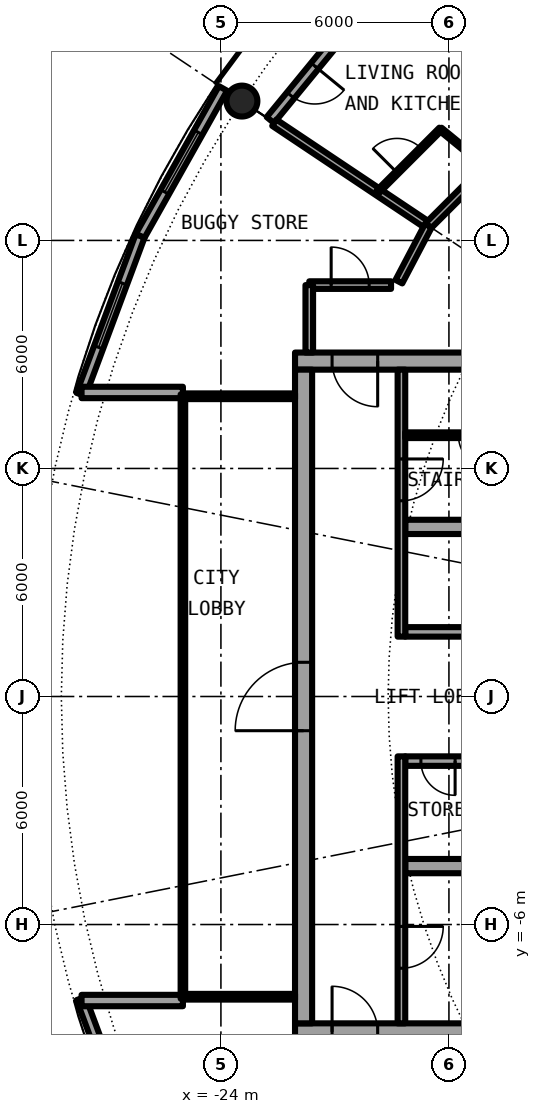
"""IFC4 building model, lengths in metres.
Left out: names, types, materials, properties, quantities, classifications, styles, units other than length and angle.
Written with IfcOpenShell. Run it as: python <this file> out.ifc"""

import sys

from ifc_helpers import new_model, si_unit, direction, frame, frame_2d, origin, origin_2d, place, context, subcontext, project, spatial, rectangle, hollow_circle, extrude, element, fill, save


model = new_model("IFC4")
c1 = context("Model", 3, precision=1e-05, world=origin(), true_north=direction((0.0, 1.0)))
c2 = subcontext(c1, "Body", "Model", "MODEL_VIEW")
j1 = project(units=[si_unit("LENGTHUNIT", "METRE"), si_unit("PLANEANGLEUNIT", "RADIAN")], contexts=[c1])
p1 = place(None, origin())
s1 = spatial("IfcSite", under=j1, at=p1, CompositionType="ELEMENT")
p2 = place(p1, origin())
s2 = spatial("IfcBuilding", under=s1, at=p2, CompositionType="ELEMENT")
p3 = place(p2, frame((0.0, 0.0, 199.35)))
s3 = spatial("IfcBuildingStorey", under=s2, at=p3, CompositionType="ELEMENT", Elevation=199.35)
p4 = place(p3, frame((-23.448, 15.667, 0.0), z_axis=(0.0, 0.0, 1.0), x_axis=(1.0, 0.0, 0.0)))
e1 = element("IfcColumn", 1, at=p4, inside=s3, PredefinedType="COLUMN", context=c2, shape_type="SweptSolid", body=[
    extrude(hollow_circle(Radius=0.406, WallThickness=0.03, at=origin_2d()), origin(), (0.0, 0.0, 1.0), 3.05),
])
p5 = place(p3, frame((-19.304, 19.304, 0.0), z_axis=(0.0, 0.0, 1.0), x_axis=(-0.634382322723, -0.773019449054, 0.0)))
e2 = element("IfcWall", 2, at=p5, inside=s3, PredefinedType="SOLIDWALL", context=c2, shape_type="SweptSolid", body=[
    extrude(rectangle(XDim=5.352, YDim=0.25, at=frame_2d((2.676, 0.0))), origin(), (0.0, 0.0, 1.0), 2.7),
])
p6 = place(p5, frame((0.441, 0.0, 0.3)))
e3 = element("IfcOpeningElement", 3, at=p6, cuts=e2, PredefinedType="OPENING", context=c2, shape_type="SweptSolid", body=[
    extrude(rectangle(XDim=1.8, YDim=2.1, at=frame_2d((0.9, 1.05))), frame((0.0, 0.135, 0.0), z_axis=(0.0, -1.0, 0.0), x_axis=(1.0, 0.0, 0.0)), (0.0, 0.0, 1.0), 0.27),
])
p7 = place(p5, frame((3.51, 0.0, 0.0)))
e4 = element("IfcOpeningElement", 4, at=p7, cuts=e2, PredefinedType="OPENING", context=c2, shape_type="SweptSolid", body=[
    extrude(rectangle(XDim=1.0, YDim=2.2, at=frame_2d((0.5, 1.1))), frame((0.0, 0.135, 0.0), z_axis=(0.0, -1.0, 0.0), x_axis=(1.0, 0.0, 0.0)), (0.0, 0.0, 1.0), 0.27),
])
p8 = place(p3, frame((-27.682, -7.945, 0.0), z_axis=(0.0, 0.0, 1.0), x_axis=(0.349247811493, -0.937030397675, 0.0)))
e5 = element("IfcWall", 5, at=p8, inside=s3, PredefinedType="SOLIDWALL", context=c2, shape_type="SweptSolid", body=[
    extrude(rectangle(XDim=4.452, YDim=0.25, at=frame_2d((2.226, 0.0))), origin(), (0.0, 0.0, 1.0), 2.7),
])
p9 = place(p8, frame((1.327, 0.0, 0.3)))
e6 = element("IfcOpeningElement", 6, at=p9, cuts=e5, PredefinedType="OPENING", context=c2, shape_type="SweptSolid", body=[
    extrude(rectangle(XDim=1.8, YDim=2.1, at=frame_2d((0.9, 1.05))), frame((0.0, 0.135, 0.0), z_axis=(0.0, -1.0, 0.0), x_axis=(1.0, 0.0, 0.0)), (0.0, 0.0, 1.0), 0.27),
])
p10 = place(p3, frame((-23.946, 16.0, 0.0), z_axis=(0.0, 0.0, 1.0), x_axis=(-0.489696356642, -0.871893042919, 0.0)))
e7 = element("IfcWall", 7, at=p10, inside=s3, PredefinedType="SOLIDWALL", context=c2, shape_type="SweptSolid", body=[
    extrude(rectangle(XDim=4.454, YDim=0.25, at=frame_2d((2.227, 0.0))), origin(), (0.0, 0.0, 1.0), 2.7),
])
p11 = place(p10, frame((1.327, 0.0, 0.3)))
e8 = element("IfcOpeningElement", 8, at=p11, cuts=e7, PredefinedType="OPENING", context=c2, shape_type="SweptSolid", body=[
    extrude(rectangle(XDim=1.8, YDim=2.1, at=frame_2d((0.9, 1.05))), frame((0.0, 0.135, 0.0), z_axis=(0.0, -1.0, 0.0), x_axis=(1.0, 0.0, 0.0)), (0.0, 0.0, 1.0), 0.27),
])
p12 = place(p3, frame((-26.127, 12.117, 0.0), z_axis=(0.0, 0.0, 1.0), x_axis=(-0.349247811493, -0.937030397675, 0.0)))
e9 = element("IfcWall", 9, at=p12, inside=s3, PredefinedType="SOLIDWALL", context=c2, shape_type="SweptSolid", body=[
    extrude(rectangle(XDim=4.452, YDim=0.25, at=frame_2d((2.226, 0.0))), origin(), (0.0, 0.0, 1.0), 2.7),
])
p13 = place(p12, frame((1.327, 0.0, 0.3)))
e10 = element("IfcOpeningElement", 10, at=p13, cuts=e9, PredefinedType="OPENING", context=c2, shape_type="SweptSolid", body=[
    extrude(rectangle(XDim=1.8, YDim=2.1, at=frame_2d((0.9, 1.05))), frame((0.0, 0.135, 0.0), z_axis=(0.0, -1.0, 0.0), x_axis=(1.0, 0.0, 0.0)), (0.0, 0.0, 1.0), 0.27),
])
for number, where, z_axis, x_axis in (
    (11, (-25.0, 8.0, 0.0), (0.0, 0.0, 1.0), (-1.0, 0.0, 0.0)),
    (12, (-25.0, -8.0, 0.0), (0.0, 0.0, 1.0), (-1.0, 0.0, 0.0)),
):
    element("IfcWall", number, at=place(p3, frame(where, z_axis=z_axis, x_axis=x_axis)), inside=s3, PredefinedType="SOLIDWALL", context=c2, shape_type="SweptSolid", body=[
        extrude(rectangle(XDim=2.667, YDim=0.3, at=frame_2d((1.333, 0.0))), origin(), (0.0, 0.0, 1.0), 2.7),
    ])
p14 = place(p3, frame((-22.05, -8.825, 0.0), z_axis=(0.0, 0.0, 1.0), x_axis=(1.0, 0.0, 0.0)))
e13 = element("IfcWall", 13, at=p14, inside=s3, PredefinedType="SHEAR", context=c2, shape_type="SweptSolid", body=[
    extrude(rectangle(XDim=13.5, YDim=0.45, at=frame_2d((6.75, 0.0))), origin(), (0.0, 0.0, 1.0), 3.05),
])
p15 = place(p14, frame((0.975, 0.0, 0.0)))
e14 = element("IfcOpeningElement", 14, at=p15, cuts=e13, PredefinedType="OPENING", context=c2, shape_type="SweptSolid", body=[
    extrude(rectangle(XDim=1.2, YDim=2.3, at=frame_2d((0.6, 1.15))), frame((0.0, 0.235, 0.0), z_axis=(0.0, -1.0, 0.0), x_axis=(1.0, 0.0, 0.0)), (0.0, 0.0, 1.0), 0.47),
])
p16 = place(p3, frame((-8.55, 8.825, 0.0), z_axis=(0.0, 0.0, 1.0), x_axis=(-1.0, 0.0, 0.0)))
e15 = element("IfcWall", 15, at=p16, inside=s3, PredefinedType="SHEAR", context=c2, shape_type="SweptSolid", body=[
    extrude(rectangle(XDim=13.5, YDim=0.45, at=frame_2d((6.75, 0.0))), origin(), (0.0, 0.0, 1.0), 3.05),
])
p17 = place(p16, frame((11.325, 0.0, 0.0)))
e16 = element("IfcOpeningElement", 16, at=p17, cuts=e15, PredefinedType="OPENING", context=c2, shape_type="SweptSolid", body=[
    extrude(rectangle(XDim=1.2, YDim=2.3, at=frame_2d((0.6, 1.15))), frame((0.0, 0.235, 0.0), z_axis=(0.0, -1.0, 0.0), x_axis=(1.0, 0.0, 0.0)), (0.0, 0.0, 1.0), 0.47),
])
p18 = place(p3, frame((-21.825, -8.6, 0.0), z_axis=(0.0, 0.0, 1.0), x_axis=(0.0, 1.0, 0.0)))
e17 = element("IfcWall", 17, at=p18, inside=s3, PredefinedType="SHEAR", context=c2, shape_type="SweptSolid", body=[
    extrude(rectangle(XDim=17.2, YDim=0.45, at=frame_2d((8.6, 0.0))), origin(), (0.0, 0.0, 1.0), 3.05),
])
p19 = place(p18, frame((7.7, 0.0, 0.0)))
e18 = element("IfcOpeningElement", 18, at=p19, cuts=e17, PredefinedType="OPENING", context=c2, shape_type="SweptSolid", body=[
    extrude(rectangle(XDim=1.8, YDim=2.3, at=frame_2d((0.9, 1.15))), frame((0.0, 0.235, 0.0), z_axis=(0.0, -1.0, 0.0), x_axis=(1.0, 0.0, 0.0)), (0.0, 0.0, 1.0), 0.47),
])
p20 = place(p3, frame((-9.0, -1.7, 0.0), z_axis=(0.0, 0.0, 1.0), x_axis=(-1.0, 0.0, 0.0)))
e19 = element("IfcWall", 19, at=p20, inside=s3, PredefinedType="SHEAR", context=c2, shape_type="SweptSolid", body=[
    extrude(rectangle(XDim=10.15, YDim=0.25, at=frame_2d((5.075, 0.0))), origin(), (0.0, 0.0, 1.0), 3.05),
])
p21 = place(p20, frame((2.488, 0.0, 0.0)))
e20 = element("IfcOpeningElement", 20, at=p21, cuts=e19, PredefinedType="OPENING", context=c2, shape_type="SweptSolid", body=[
    extrude(rectangle(XDim=0.9, YDim=2.3, at=frame_2d((0.45, 1.15))), frame((0.0, 0.135, 0.0), z_axis=(0.0, -1.0, 0.0), x_axis=(1.0, 0.0, 0.0)), (0.0, 0.0, 1.0), 0.27),
])
p22 = place(p20, frame((8.837, 0.0, 0.0)))
e21 = element("IfcOpeningElement", 21, at=p22, cuts=e19, PredefinedType="OPENING", context=c2, shape_type="SweptSolid", body=[
    extrude(rectangle(XDim=0.9, YDim=2.3, at=frame_2d((0.45, 1.15))), frame((0.0, 0.135, 0.0), z_axis=(0.0, -1.0, 0.0), x_axis=(1.0, 0.0, 0.0)), (0.0, 0.0, 1.0), 0.27),
])
p23 = place(p3, frame((-9.0, -4.462, 0.0), z_axis=(0.0, 0.0, 1.0), x_axis=(-1.0, 0.0, 0.0)))
e22 = element("IfcWall", 22, at=p23, inside=s3, PredefinedType="SHEAR", context=c2, shape_type="SweptSolid", body=[
    extrude(rectangle(XDim=10.15, YDim=0.375, at=frame_2d((5.075, 0.0))), origin(), (0.0, 0.0, 1.0), 3.05),
])
p24 = place(p23, frame((6.6, 0.0, 0.0)))
e23 = element("IfcOpeningElement", 23, at=p24, cuts=e22, PredefinedType="OPENING", context=c2, shape_type="SweptSolid", body=[
    extrude(rectangle(XDim=1.1, YDim=2.3, at=frame_2d((0.55, 1.15))), frame((0.0, 0.198, 0.0), z_axis=(0.0, -1.0, 0.0), x_axis=(1.0, 0.0, 0.0)), (0.0, 0.0, 1.0), 0.395),
])
p25 = place(p3, frame((-19.25, -1.575, 0.0), z_axis=(0.0, 0.0, 1.0), x_axis=(0.0, -1.0, 0.0)))
e24 = element("IfcWall", 24, at=p25, inside=s3, PredefinedType="SOLIDWALL", context=c2, shape_type="SweptSolid", body=[
    extrude(rectangle(XDim=7.025, YDim=0.2, at=frame_2d((3.513, 0.0))), origin(), (0.0, 0.0, 1.0), 2.7),
])
p26 = place(p25, frame((4.475, 0.0, 0.0)))
e25 = element("IfcOpeningElement", 25, at=p26, cuts=e24, PredefinedType="OPENING", context=c2, shape_type="SweptSolid", body=[
    extrude(rectangle(XDim=1.1, YDim=2.3, at=frame_2d((0.55, 1.15))), frame((0.0, 0.11, 0.0), z_axis=(0.0, -1.0, 0.0), x_axis=(1.0, 0.0, 0.0)), (0.0, 0.0, 1.0), 0.22),
])
p27 = place(p3, frame((-9.0, 1.7, 0.0), z_axis=(0.0, 0.0, 1.0), x_axis=(-1.0, 0.0, 0.0)))
e26 = element("IfcWall", 26, at=p27, inside=s3, PredefinedType="SHEAR", context=c2, shape_type="SweptSolid", body=[
    extrude(rectangle(XDim=10.15, YDim=0.25, at=frame_2d((5.075, 0.0))), origin(), (0.0, 0.0, 1.0), 3.05),
])
p28 = place(p27, frame((0.387, 0.0, 0.0)))
e27 = element("IfcOpeningElement", 27, at=p28, cuts=e26, PredefinedType="OPENING", context=c2, shape_type="SweptSolid", body=[
    extrude(rectangle(XDim=1.1, YDim=2.3, at=frame_2d((0.55, 1.15))), frame((0.0, 0.135, 0.0), z_axis=(0.0, -1.0, 0.0), x_axis=(1.0, 0.0, 0.0)), (0.0, 0.0, 1.0), 0.27),
])
p29 = place(p27, frame((2.45, 0.0, 0.0)))
e28 = element("IfcOpeningElement", 28, at=p29, cuts=e26, PredefinedType="OPENING", context=c2, shape_type="SweptSolid", body=[
    extrude(rectangle(XDim=1.1, YDim=2.3, at=frame_2d((0.55, 1.15))), frame((0.0, 0.135, 0.0), z_axis=(0.0, -1.0, 0.0), x_axis=(1.0, 0.0, 0.0)), (0.0, 0.0, 1.0), 0.27),
])
p30 = place(p27, frame((4.45, 0.0, 0.0)))
e29 = element("IfcOpeningElement", 29, at=p30, cuts=e26, PredefinedType="OPENING", context=c2, shape_type="SweptSolid", body=[
    extrude(rectangle(XDim=1.1, YDim=2.3, at=frame_2d((0.55, 1.15))), frame((0.0, 0.135, 0.0), z_axis=(0.0, -1.0, 0.0), x_axis=(1.0, 0.0, 0.0)), (0.0, 0.0, 1.0), 0.27),
])
p31 = place(p27, frame((6.6, 0.0, 0.0)))
e30 = element("IfcOpeningElement", 30, at=p31, cuts=e26, PredefinedType="OPENING", context=c2, shape_type="SweptSolid", body=[
    extrude(rectangle(XDim=1.1, YDim=2.3, at=frame_2d((0.55, 1.15))), frame((0.0, 0.135, 0.0), z_axis=(0.0, -1.0, 0.0), x_axis=(1.0, 0.0, 0.0)), (0.0, 0.0, 1.0), 0.27),
])
p32 = place(p3, frame((-9.0, 4.462, 0.0), z_axis=(0.0, 0.0, 1.0), x_axis=(-1.0, 0.0, 0.0)))
e31 = element("IfcWall", 31, at=p32, inside=s3, PredefinedType="SHEAR", context=c2, shape_type="SweptSolid", body=[
    extrude(rectangle(XDim=10.15, YDim=0.375, at=frame_2d((5.075, 0.0))), origin(), (0.0, 0.0, 1.0), 3.05),
])
p33 = place(p3, frame((-19.25, 8.6, 0.0), z_axis=(0.0, 0.0, 1.0), x_axis=(0.0, -1.0, 0.0)))
e32 = element("IfcWall", 32, at=p33, inside=s3, PredefinedType="SOLIDWALL", context=c2, shape_type="SweptSolid", body=[
    extrude(rectangle(XDim=7.025, YDim=0.2, at=frame_2d((3.513, 0.0))), origin(), (0.0, 0.0, 1.0), 2.7),
])
p34 = place(p33, frame((2.35, 0.0, 0.0)))
e33 = element("IfcOpeningElement", 33, at=p34, cuts=e32, PredefinedType="OPENING", context=c2, shape_type="SweptSolid", body=[
    extrude(rectangle(XDim=1.1, YDim=2.3, at=frame_2d((0.55, 1.15))), frame((0.0, 0.11, 0.0), z_axis=(0.0, -1.0, 0.0), x_axis=(1.0, 0.0, 0.0)), (0.0, 0.0, 1.0), 0.22),
])
p35 = place(p3, frame((-15.45, 6.875, 0.0), z_axis=(0.0, 0.0, 1.0), x_axis=(-1.0, 0.0, 0.0)))
e34 = element("IfcWall", 34, at=p35, inside=s3, PredefinedType="PARTITIONING", context=c2, shape_type="SweptSolid", body=[
    extrude(rectangle(XDim=3.7, YDim=0.15, at=frame_2d((1.85, 0.0))), origin(), (0.0, 0.0, 1.0), 2.7),
])
p36 = place(p35, frame((1.4, 0.0, 0.0)))
e35 = element("IfcOpeningElement", 35, at=p36, cuts=e34, PredefinedType="OPENING", context=c2, shape_type="SweptSolid", body=[
    extrude(rectangle(XDim=0.9, YDim=2.3, at=frame_2d((0.45, 1.15))), frame((0.0, 0.085, 0.0), z_axis=(0.0, -1.0, 0.0), x_axis=(1.0, 0.0, 0.0)), (0.0, 0.0, 1.0), 0.17),
])
for number, where, z_axis, x_axis in (
    (36, (-22.05, 7.9, 0.0), (0.0, 0.0, 1.0), (-1.0, 0.0, 0.0)),
    (37, (-22.05, -7.9, 0.0), (0.0, 0.0, 1.0), (-1.0, 0.0, 0.0)),
):
    element("IfcWall", number, at=place(p3, frame(where, z_axis=z_axis, x_axis=x_axis)), inside=s3, PredefinedType="PARTITIONING", context=c2, shape_type="SweptSolid", body=[
        extrude(rectangle(XDim=2.89, YDim=0.15, at=frame_2d((1.445, 0.0))), origin(), (0.0, 0.0, 1.0), 2.7),
    ])
p37 = place(p3, frame((-25.0, 7.95, 0.0), z_axis=(0.0, 0.0, 1.0), x_axis=(0.0, -1.0, 0.0)))
e38 = element("IfcWall", 38, at=p37, inside=s3, PredefinedType="PARTITIONING", context=c2, shape_type="SweptSolid", body=[
    extrude(rectangle(XDim=15.9, YDim=0.12, at=frame_2d((7.95, 0.0))), origin(), (0.0, 0.0, 1.0), 2.7),
])
p38 = place(p37, frame((0.95, 0.0, 0.1)))
e39 = element("IfcOpeningElement", 39, at=p38, cuts=e38, PredefinedType="OPENING", context=c2, shape_type="SweptSolid", body=[
    extrude(rectangle(XDim=14.0, YDim=2.35, at=frame_2d((7.0, 1.175))), frame((0.0, 0.07, 0.0), z_axis=(0.0, -1.0, 0.0), x_axis=(1.0, 0.0, 0.0)), (0.0, 0.0, 1.0), 0.14),
])
p39 = place(p3, frame((-18.224, 14.927, 0.0), z_axis=(0.0, 0.0, 1.0), x_axis=(0.773446828454, -0.633861186344, 0.0)))
e40 = element("IfcWall", 40, at=p39, inside=s3, PredefinedType="PARTITIONING", context=c2, shape_type="SweptSolid", body=[
    extrude(rectangle(XDim=1.578, YDim=0.1, at=frame_2d((0.789, 0.0))), origin(), (0.0, 0.0, 1.0), 2.7),
])
p40 = place(p3, frame((-22.595, 15.098, 0.0), z_axis=(0.0, 0.0, 1.0), x_axis=(0.831387096605, -0.55569370664, 0.0)))
e41 = element("IfcWall", 41, at=p40, inside=s3, PredefinedType="PARTITIONING", context=c2, shape_type="SweptSolid", body=[
    extrude(rectangle(XDim=4.875, YDim=0.2, at=frame_2d((2.438, 0.0))), origin(), (0.0, 0.0, 1.0), 2.7),
])
p41 = place(p3, frame((-19.216, 19.216, 0.0), z_axis=(0.0, 0.0, 1.0), x_axis=(0.707106781187, -0.707106781187, 0.0)))
e42 = element("IfcWall", 42, at=p41, inside=s3, PredefinedType="PARTITIONING", context=c2, shape_type="SweptSolid", body=[
    extrude(rectangle(XDim=3.735, YDim=0.1, at=frame_2d((1.868, 0.0))), origin(), (0.0, 0.0, 1.0), 2.7),
])
p42 = place(p41, frame((1.417, 0.0, 0.0)))
e43 = element("IfcOpeningElement", 43, at=p42, cuts=e42, PredefinedType="OPENING", context=c2, shape_type="SweptSolid", body=[
    extrude(rectangle(XDim=0.9, YDim=2.3, at=frame_2d((0.45, 1.15))), frame((0.0, 0.06, 0.0), z_axis=(0.0, -1.0, 0.0), x_axis=(1.0, 0.0, 0.0)), (0.0, 0.0, 1.0), 0.12),
])
p43 = place(p3, frame((-21.675, 10.825, 0.0), z_axis=(0.0, 0.0, 1.0), x_axis=(1.0, 0.0, 0.0)))
e44 = element("IfcWall", 44, at=p43, inside=s3, PredefinedType="PARTITIONING", context=c2, shape_type="SweptSolid", body=[
    extrude(rectangle(XDim=2.152, YDim=0.2, at=frame_2d((1.076, 0.0))), origin(), (0.0, 0.0, 1.0), 2.7),
])
p44 = place(p43, frame((0.576, 0.0, 0.0)))
e45 = element("IfcOpeningElement", 45, at=p44, cuts=e44, PredefinedType="OPENING", context=c2, shape_type="SweptSolid", body=[
    extrude(rectangle(XDim=1.0, YDim=2.3, at=frame_2d((0.5, 1.15))), frame((0.0, 0.11, 0.0), z_axis=(0.0, -1.0, 0.0), x_axis=(1.0, 0.0, 0.0)), (0.0, 0.0, 1.0), 0.22),
])
p45 = place(p3, frame((-21.675, 9.05, 0.0), z_axis=(0.0, 0.0, 1.0), x_axis=(0.0, 1.0, 0.0)))
e46 = element("IfcWall", 46, at=p45, inside=s3, PredefinedType="PARTITIONING", context=c2, shape_type="SweptSolid", body=[
    extrude(rectangle(XDim=1.775, YDim=0.2, at=frame_2d((0.887, 0.0))), origin(), (0.0, 0.0, 1.0), 2.7),
])
p46 = place(p3, frame((-18.542, 12.389, 0.0), z_axis=(0.0, 0.0, 1.0), x_axis=(0.707106781187, 0.707106781187, 0.0)))
e47 = element("IfcWall", 47, at=p46, inside=s3, PredefinedType="PARTITIONING", context=c2, shape_type="SweptSolid", body=[
    extrude(rectangle(XDim=8.702, YDim=0.2, at=frame_2d((4.351, 0.0))), origin(), (0.0, 0.0, 1.0), 2.7),
])
p47 = place(p46, frame((4.938, 0.0, 0.0)))
e48 = element("IfcOpeningElement", 48, at=p47, cuts=e47, PredefinedType="OPENING", context=c2, shape_type="SweptSolid", body=[
    extrude(rectangle(XDim=1.0, YDim=2.3, at=frame_2d((0.5, 1.15))), frame((0.0, 0.11, 0.0), z_axis=(0.0, -1.0, 0.0), x_axis=(1.0, 0.0, 0.0)), (0.0, 0.0, 1.0), 0.22),
])
p48 = place(p3, frame((-19.317, 10.915, 0.0), z_axis=(0.0, 0.0, 1.0), x_axis=(0.465359652486, 0.885121683068, 0.0)))
e49 = element("IfcWall", 49, at=p48, inside=s3, PredefinedType="PARTITIONING", context=c2, shape_type="SweptSolid", body=[
    extrude(rectangle(XDim=1.665, YDim=0.2, at=frame_2d((0.833, 0.0))), origin(), (0.0, 0.0, 1.0), 2.7),
])
p49 = place(p3, frame((-19.867, 13.283, 0.0), z_axis=(0.0, 0.0, 1.0), x_axis=(0.707106781187, 0.707106781187, 0.0)))
e50 = element("IfcWall", 50, at=p49, inside=s3, PredefinedType="PARTITIONING", context=c2, shape_type="SweptSolid", body=[
    extrude(rectangle(XDim=2.332, YDim=0.1, at=frame_2d((1.166, 0.0))), origin(), (0.0, 0.0, 1.0), 2.7),
])
p50 = place(p49, frame((0.709, 0.0, 0.0)))
e51 = element("IfcOpeningElement", 51, at=p50, cuts=e50, PredefinedType="OPENING", context=c2, shape_type="SweptSolid", body=[
    extrude(rectangle(XDim=0.9, YDim=2.3, at=frame_2d((0.45, 1.15))), frame((0.0, 0.06, 0.0), z_axis=(0.0, -1.0, 0.0), x_axis=(1.0, 0.0, 0.0)), (0.0, 0.0, 1.0), 0.12),
])
p51 = place(p7, origin())
e52 = element("IfcDoor", 52, at=p51, inside=s3, OperationType="SINGLE_SWING_LEFT", PredefinedType="DOOR", context=c2, shape_type="SweptSolid", body=[
    extrude(rectangle(XDim=1.0, YDim=2.2, at=frame_2d((0.5, 1.1))), frame((0.0, 0.025, 0.0), z_axis=(0.0, -1.0, 0.0), x_axis=(1.0, 0.0, 0.0)), (0.0, 0.0, 1.0), 0.05),
])
fill(e4, e52)
p52 = place(p11, origin())
e53 = element("IfcWindow", 53, at=p52, inside=s3, PartitioningType="SINGLE_PANEL", PredefinedType="WINDOW", context=c2, shape_type="SweptSolid", body=[
    extrude(rectangle(XDim=1.8, YDim=2.1, at=frame_2d((0.9, 1.05))), frame((0.0, 0.03, 0.0), z_axis=(0.0, -1.0, 0.0), x_axis=(1.0, 0.0, 0.0)), (0.0, 0.0, 1.0), 0.06),
])
fill(e8, e53)
p53 = place(p13, origin())
e54 = element("IfcWindow", 54, at=p53, inside=s3, PartitioningType="SINGLE_PANEL", PredefinedType="WINDOW", context=c2, shape_type="SweptSolid", body=[
    extrude(rectangle(XDim=1.8, YDim=2.1, at=frame_2d((0.9, 1.05))), frame((0.0, 0.03, 0.0), z_axis=(0.0, -1.0, 0.0), x_axis=(1.0, 0.0, 0.0)), (0.0, 0.0, 1.0), 0.06),
])
fill(e10, e54)
p54 = place(p22, origin())
e55 = element("IfcDoor", 55, at=p54, inside=s3, OperationType="SINGLE_SWING_LEFT", PredefinedType="DOOR", context=c2, shape_type="SweptSolid", body=[
    extrude(rectangle(XDim=0.9, YDim=2.3, at=frame_2d((0.45, 1.15))), frame((0.0, 0.025, 0.0), z_axis=(0.0, -1.0, 0.0), x_axis=(1.0, 0.0, 0.0)), (0.0, 0.0, 1.0), 0.05),
])
fill(e21, e55)
p55 = place(p36, origin())
e56 = element("IfcDoor", 56, at=p55, inside=s3, OperationType="SINGLE_SWING_LEFT", PredefinedType="DOOR", context=c2, shape_type="SweptSolid", body=[
    extrude(rectangle(XDim=0.9, YDim=2.3, at=frame_2d((0.45, 1.15))), frame((0.0, 0.025, 0.0), z_axis=(0.0, -1.0, 0.0), x_axis=(1.0, 0.0, 0.0)), (0.0, 0.0, 1.0), 0.05),
])
fill(e35, e56)
p56 = place(p26, origin())
e57 = element("IfcDoor", 57, at=p56, inside=s3, OperationType="SINGLE_SWING_LEFT", PredefinedType="DOOR", context=c2, shape_type="SweptSolid", body=[
    extrude(rectangle(XDim=1.1, YDim=2.3, at=frame_2d((0.55, 1.15))), frame((0.0, 0.025, 0.0), z_axis=(0.0, -1.0, 0.0), x_axis=(1.0, 0.0, 0.0)), (0.0, 0.0, 1.0), 0.05),
])
fill(e25, e57)
p57 = place(p34, origin())
e58 = element("IfcDoor", 58, at=p57, inside=s3, OperationType="SINGLE_SWING_RIGHT", PredefinedType="DOOR", context=c2, shape_type="SweptSolid", body=[
    extrude(rectangle(XDim=1.1, YDim=2.3, at=frame_2d((0.55, 1.15))), frame((0.0, 0.025, 0.0), z_axis=(0.0, -1.0, 0.0), x_axis=(1.0, 0.0, 0.0)), (0.0, 0.0, 1.0), 0.05),
])
fill(e33, e58)
p58 = place(p15, origin())
e59 = element("IfcDoor", 59, at=p58, inside=s3, OperationType="SINGLE_SWING_RIGHT", PredefinedType="DOOR", context=c2, shape_type="SweptSolid", body=[
    extrude(rectangle(XDim=1.2, YDim=2.3, at=frame_2d((0.6, 1.15))), frame((0.0, 0.025, 0.0), z_axis=(0.0, -1.0, 0.0), x_axis=(1.0, 0.0, 0.0)), (0.0, 0.0, 1.0), 0.05),
])
fill(e14, e59)
p59 = place(p17, origin())
e60 = element("IfcDoor", 60, at=p59, inside=s3, OperationType="SINGLE_SWING_LEFT", PredefinedType="DOOR", context=c2, shape_type="SweptSolid", body=[
    extrude(rectangle(XDim=1.2, YDim=2.3, at=frame_2d((0.6, 1.15))), frame((0.0, 0.025, 0.0), z_axis=(0.0, -1.0, 0.0), x_axis=(1.0, 0.0, 0.0)), (0.0, 0.0, 1.0), 0.05),
])
fill(e16, e60)
p60 = place(p19, origin())
e61 = element("IfcDoor", 61, at=p60, inside=s3, OperationType="SINGLE_SWING_LEFT", PredefinedType="DOOR", context=c2, shape_type="SweptSolid", body=[
    extrude(rectangle(XDim=1.8, YDim=2.3, at=frame_2d((0.9, 1.15))), frame((0.0, 0.025, 0.0), z_axis=(0.0, -1.0, 0.0), x_axis=(1.0, 0.0, 0.0)), (0.0, 0.0, 1.0), 0.05),
])
fill(e18, e61)
p61 = place(p38, origin())
e62 = element("IfcWindow", 62, at=p61, inside=s3, PartitioningType="SINGLE_PANEL", PredefinedType="WINDOW", context=c2, shape_type="SweptSolid", body=[
    extrude(rectangle(XDim=14.0, YDim=2.35, at=frame_2d((7.0, 1.175))), frame((0.0, 0.03, 0.0), z_axis=(0.0, -1.0, 0.0), x_axis=(1.0, 0.0, 0.0)), (0.0, 0.0, 1.0), 0.06),
])
fill(e39, e62)
p62 = place(p50, origin())
e63 = element("IfcDoor", 63, at=p62, inside=s3, OperationType="SINGLE_SWING_LEFT", PredefinedType="DOOR", context=c2, shape_type="SweptSolid", body=[
    extrude(rectangle(XDim=0.9, YDim=2.3, at=frame_2d((0.45, 1.15))), frame((0.0, 0.025, 0.0), z_axis=(0.0, -1.0, 0.0), x_axis=(1.0, 0.0, 0.0)), (0.0, 0.0, 1.0), 0.05),
])
fill(e51, e63)
p63 = place(p44, origin())
e64 = element("IfcDoor", 64, at=p63, inside=s3, OperationType="SINGLE_SWING_LEFT", PredefinedType="DOOR", context=c2, shape_type="SweptSolid", body=[
    extrude(rectangle(XDim=1.0, YDim=2.3, at=frame_2d((0.5, 1.15))), frame((0.0, 0.025, 0.0), z_axis=(0.0, -1.0, 0.0), x_axis=(1.0, 0.0, 0.0)), (0.0, 0.0, 1.0), 0.05),
])
fill(e45, e64)
save(model, sys.argv[1])
